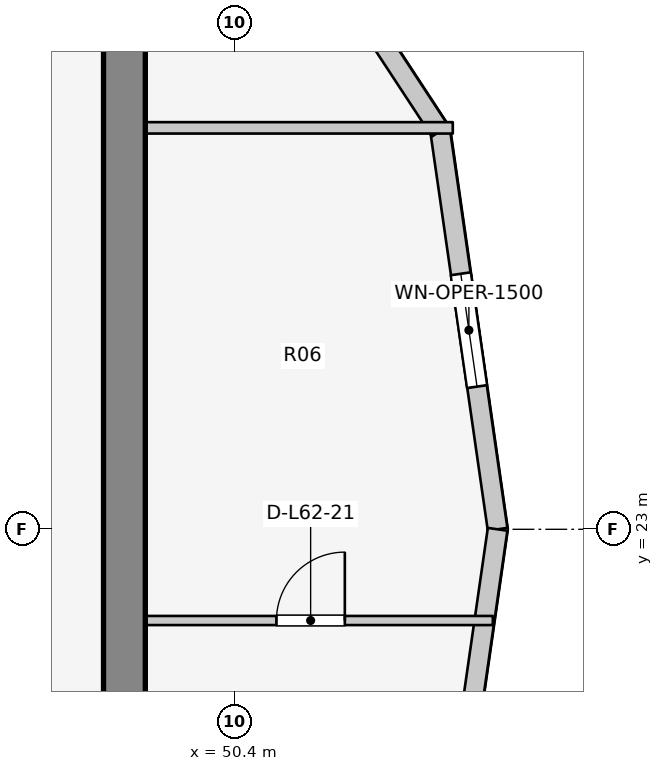
"""IFC4 building model, lengths in metres.
Left out: names, types, materials, properties, quantities, classifications, styles, units other than length and angle.
Written with IfcOpenShell. Run it as: python <this file> out.ifc"""

import sys

from ifc_helpers import new_model, si_unit, direction, frame, frame_2d, origin, place, context, subcontext, project, spatial, rectangle, extrude, element, fill, save


model = new_model("IFC4")
c1 = context("Model", 3, precision=1e-05, world=origin(), true_north=direction((0.0, 1.0)))
c2 = subcontext(c1, "Body", "Model", "MODEL_VIEW")
j1 = project(units=[si_unit("LENGTHUNIT", "METRE"), si_unit("PLANEANGLEUNIT", "RADIAN")], contexts=[c1])
p1 = place(None, origin())
s1 = spatial("IfcSite", under=j1, at=p1, CompositionType="ELEMENT")
p2 = place(p1, origin())
s2 = spatial("IfcBuilding", under=s1, at=p2, CompositionType="ELEMENT")
p3 = place(p2, frame((0.0, 0.0, 204.7)))
s3 = spatial("IfcBuildingStorey", under=s2, at=p3, CompositionType="ELEMENT", Elevation=204.7)
p4 = place(p3, frame((48.95, 17.05, 0.0), z_axis=(0.0, 0.0, 1.0), x_axis=(0.0, 1.0, 0.0)))
e1 = element("IfcWall", 1, at=p4, inside=s3, PredefinedType="SHEAR", context=c2, shape_type="SweptSolid", body=[
    extrude(rectangle(XDim=12.8, YDim=0.55, at=frame_2d((6.4, 0.0))), origin(), (0.0, 0.0, 1.0), 3.1),
])
p5 = place(p3, frame((53.86, 23.0, 0.0), z_axis=(0.0, 0.0, 1.0), x_axis=(-0.142712754019, 0.989764148593, 0.0)))
e2 = element("IfcWall", 2, at=p5, inside=s3, PredefinedType="STANDARD", context=c2, shape_type="SweptSolid", body=[
    extrude(rectangle(XDim=5.293, YDim=0.26, at=frame_2d((2.646, 0.0))), origin(), (0.0, 0.0, 1.0), 2.85),
])
p6 = place(p5, frame((1.896, 0.0, 0.75)))
e3 = element("IfcOpeningElement", 3, at=p6, cuts=e2, PredefinedType="OPENING", context=c2, shape_type="SweptSolid", body=[
    extrude(rectangle(XDim=1.5, YDim=1.6, at=frame_2d((0.75, 0.8))), frame((0.0, 0.14, 0.0), z_axis=(0.0, -1.0, 0.0), x_axis=(1.0, 0.0, 0.0)), (0.0, 0.0, 1.0), 0.28),
])
p7 = place(p3, frame((53.105, 28.239, 0.0), z_axis=(0.0, 0.0, 1.0), x_axis=(-0.548776305075, 0.835969238064, 0.0)))
e4 = element("IfcWall", 4, at=p7, inside=s3, PredefinedType="STANDARD", context=c2, shape_type="SweptSolid", body=[
    extrude(rectangle(XDim=4.271, YDim=0.26, at=frame_2d((2.135, 0.0))), origin(), (0.0, 0.0, 1.0), 2.85),
])
p8 = place(p7, frame((1.385, 0.0, 0.75)))
e5 = element("IfcOpeningElement", 5, at=p8, cuts=e4, PredefinedType="OPENING", context=c2, shape_type="SweptSolid", body=[
    extrude(rectangle(XDim=1.5, YDim=1.6, at=frame_2d((0.75, 0.8))), frame((0.0, 0.14, 0.0), z_axis=(0.0, -1.0, 0.0), x_axis=(1.0, 0.0, 0.0)), (0.0, 0.0, 1.0), 0.28),
])
p9 = place(p3, frame((53.105, 17.761, 0.0), z_axis=(0.0, 0.0, 1.0), x_axis=(0.142712754019, 0.989764148593, 0.0)))
e6 = element("IfcWall", 6, at=p9, inside=s3, PredefinedType="STANDARD", context=c2, shape_type="SweptSolid", body=[
    extrude(rectangle(XDim=5.293, YDim=0.26, at=frame_2d((2.646, 0.0))), origin(), (0.0, 0.0, 1.0), 2.85),
])
p10 = place(p9, frame((1.465, 0.0, 0.75)))
e7 = element("IfcOpeningElement", 7, at=p10, cuts=e6, PredefinedType="OPENING", context=c2, shape_type="SweptSolid", body=[
    extrude(rectangle(XDim=1.2, YDim=1.5, at=frame_2d((0.6, 0.75))), frame((0.0, 0.14, 0.0), z_axis=(0.0, -1.0, 0.0), x_axis=(1.0, 0.0, 0.0)), (0.0, 0.0, 1.0), 0.28),
])
p11 = place(p3, frame((48.95, 28.281, 0.0), z_axis=(0.0, 0.0, 1.0), x_axis=(1.0, 0.0, 0.0)))
e8 = element("IfcWall", 8, at=p11, inside=s3, PredefinedType="PARTITIONING", context=c2, shape_type="SweptSolid", body=[
    extrude(rectangle(XDim=4.32, YDim=0.15, at=frame_2d((2.16, 0.0))), origin(), (0.0, 0.0, 1.0), 2.855),
])
p12 = place(p3, frame((48.95, 21.8, 0.0), z_axis=(0.0, 0.0, 1.0), x_axis=(1.0, 0.0, 0.0)))
e9 = element("IfcWall", 9, at=p12, inside=s3, PredefinedType="MOVABLE", context=c2, shape_type="SweptSolid", body=[
    extrude(rectangle(XDim=4.847, YDim=0.12, at=frame_2d((2.424, 0.0))), origin(), (0.0, 0.0, 1.0), 2.855),
])
p13 = place(p12, frame((2.0, 0.0, 0.0)))
e10 = element("IfcOpeningElement", 10, at=p13, cuts=e9, PredefinedType="OPENING", context=c2, shape_type="SweptSolid", body=[
    extrude(rectangle(XDim=0.9, YDim=2.1, at=frame_2d((0.45, 1.05))), frame((0.0, 0.07, 0.0), z_axis=(0.0, -1.0, 0.0), x_axis=(1.0, 0.0, 0.0)), (0.0, 0.0, 1.0), 0.14),
])
p14 = place(p6, origin())
e11 = element("IfcWindow", 11, at=p14, inside=s3, PartitioningType="SINGLE_PANEL", PredefinedType="WINDOW", context=c2, shape_type="SweptSolid", body=[
    extrude(rectangle(XDim=1.5, YDim=1.6, at=frame_2d((0.75, 0.8))), frame((0.0, 0.03, 0.0), z_axis=(0.0, -1.0, 0.0), x_axis=(1.0, 0.0, 0.0)), (0.0, 0.0, 1.0), 0.06),
])
fill(e3, e11)
p15 = place(p13, origin())
e12 = element("IfcDoor", 12, at=p15, inside=s3, OperationType="SINGLE_SWING_RIGHT", PredefinedType="DOOR", context=c2, shape_type="SweptSolid", body=[
    extrude(rectangle(XDim=0.9, YDim=2.1, at=frame_2d((0.45, 1.05))), frame((0.0, 0.025, 0.0), z_axis=(0.0, -1.0, 0.0), x_axis=(1.0, 0.0, 0.0)), (0.0, 0.0, 1.0), 0.05),
])
fill(e10, e12)
save(model, sys.argv[1])
